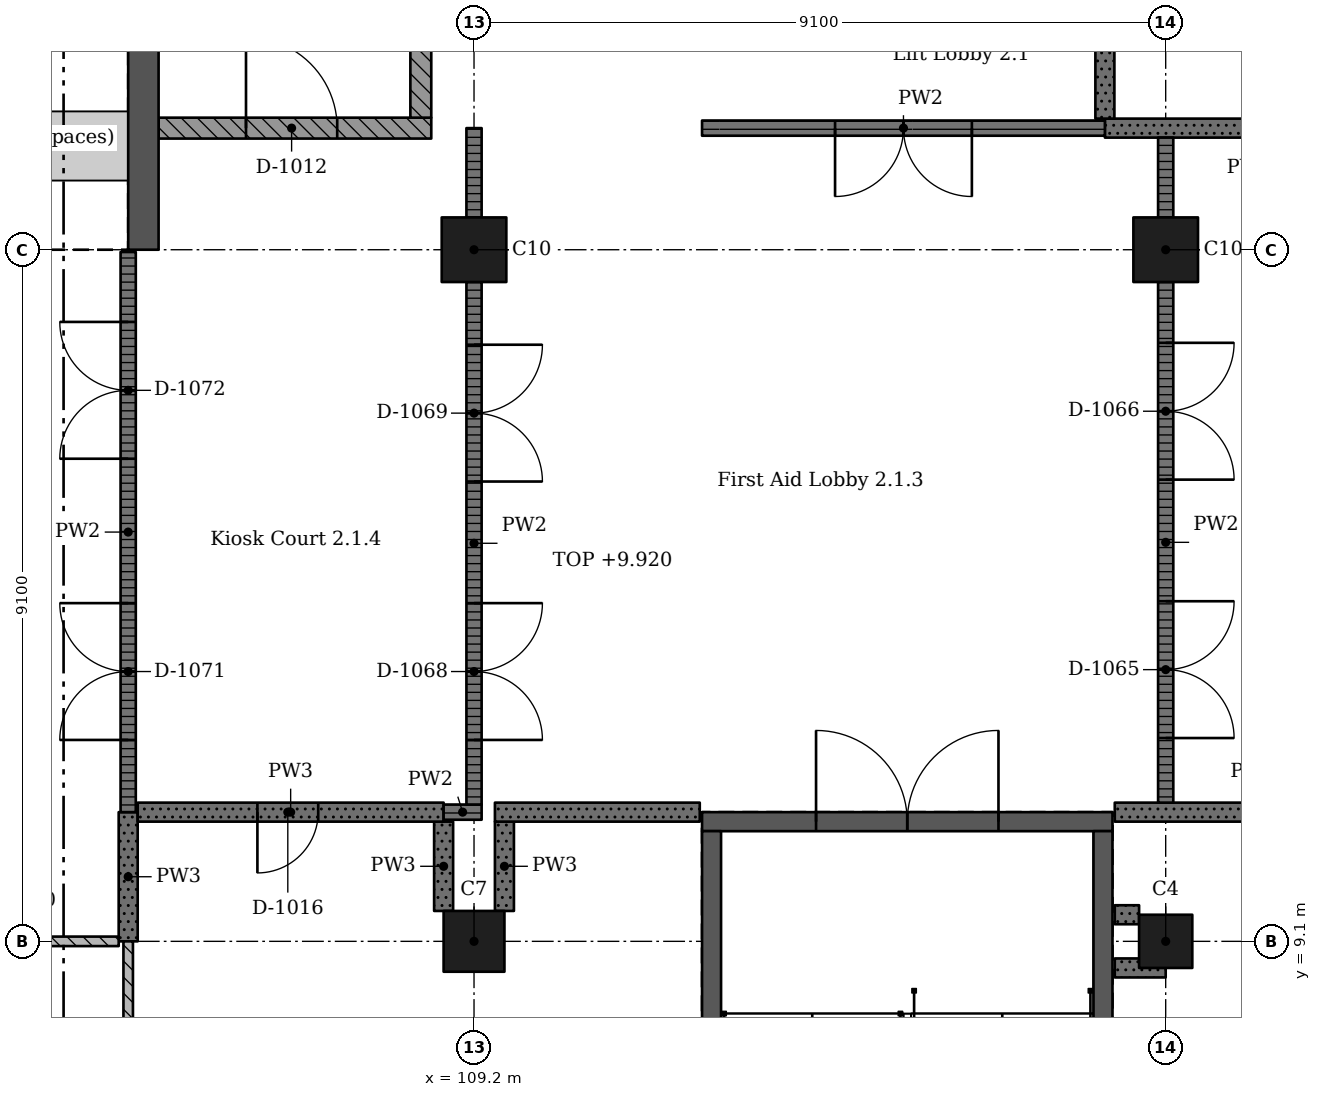
"""IFC4 building model, lengths in metres.
Left out: names, types, materials, properties, quantities, classifications, styles, units other than length and angle.
Written with IfcOpenShell. Run it as: python <this file> out.ifc"""

import sys

from ifc_helpers import new_model, si_unit, direction, frame, frame_2d, origin, origin_2d, place, context, subcontext, project, spatial, rectangle, extrude, element, fill, save


model = new_model("IFC4")
c1 = context("Model", 3, precision=1e-05, world=origin(), true_north=direction((0.0, 1.0)))
c2 = subcontext(c1, "Body", "Model", "MODEL_VIEW")
j1 = project(units=[si_unit("LENGTHUNIT", "METRE"), si_unit("PLANEANGLEUNIT", "RADIAN")], contexts=[c1])
p1 = place(None, origin())
s1 = spatial("IfcSite", under=j1, at=p1, CompositionType="ELEMENT")
p2 = place(p1, origin())
s2 = spatial("IfcBuilding", under=s1, at=p2, CompositionType="ELEMENT")
p3 = place(p2, frame((0.0, 0.0, 6.37)))
s3 = spatial("IfcBuildingStorey", under=s2, at=p3, CompositionType="ELEMENT", Elevation=6.37)
p4 = place(p3, frame((109.2, 9.1, 0.0), z_axis=(0.0, 0.0, 1.0), x_axis=(1.0, 0.0, 0.0)))
e1 = element("IfcColumn", 1, at=p4, inside=s3, PredefinedType="COLUMN", context=c2, shape_type="SweptSolid", body=[
    extrude(rectangle(XDim=0.8, YDim=0.8, at=origin_2d()), origin(), (0.0, 0.0, 1.0), 4.55),
])
p5 = place(p3, frame((109.2, 18.2, 0.0), z_axis=(0.0, 0.0, 1.0), x_axis=(1.0, 0.0, 0.0)))
e2 = element("IfcColumn", 2, at=p5, inside=s3, PredefinedType="COLUMN", context=c2, shape_type="SweptSolid", body=[
    extrude(rectangle(XDim=0.85, YDim=0.85, at=origin_2d()), origin(), (0.0, 0.0, 1.0), 4.55),
])
p6 = place(p3, frame((118.3, 9.1, 0.0), z_axis=(0.0, 0.0, 1.0), x_axis=(1.0, 0.0, 0.0)))
e3 = element("IfcColumn", 3, at=p6, inside=s3, PredefinedType="COLUMN", context=c2, shape_type="SweptSolid", body=[
    extrude(rectangle(XDim=0.7, YDim=0.7, at=origin_2d()), origin(), (0.0, 0.0, 1.0), 4.55),
])
p7 = place(p3, frame((118.3, 18.2, 0.0), z_axis=(0.0, 0.0, 1.0), x_axis=(1.0, 0.0, 0.0)))
e4 = element("IfcColumn", 4, at=p7, inside=s3, PredefinedType="COLUMN", context=c2, shape_type="SweptSolid", body=[
    extrude(rectangle(XDim=0.85, YDim=0.85, at=origin_2d()), origin(), (0.0, 0.0, 1.0), 4.55),
])
p8 = place(p3, frame((104.85, 40.95, 0.0), z_axis=(0.0, 0.0, 1.0), x_axis=(0.0, -1.0, 0.0)))
e5 = element("IfcWall", 5, at=p8, inside=s3, PredefinedType="SHEAR", context=c2, shape_type="SweptSolid", body=[
    extrude(rectangle(XDim=22.75, YDim=0.4, at=frame_2d((11.375, 0.0))), origin(), (0.0, 0.0, 1.0), 4.55),
])
p9 = place(p3, frame((117.6, 10.675, 0.0), z_axis=(0.0, 0.0, 1.0), x_axis=(-1.0, 0.0, 0.0)))
e6 = element("IfcWall", 6, at=p9, inside=s3, PredefinedType="SHEAR", context=c2, shape_type="SweptSolid", body=[
    extrude(rectangle(XDim=5.4, YDim=0.25, at=frame_2d((2.7, 0.0))), origin(), (0.0, 0.0, 1.0), 4.55),
])
p10 = place(p9, frame((1.5, 0.0, 0.0)))
e7 = element("IfcOpeningElement", 7, at=p10, cuts=e6, PredefinedType="OPENING", context=c2, shape_type="SweptSolid", body=[
    extrude(rectangle(XDim=2.4, YDim=2.1, at=frame_2d((1.2, 1.05))), frame((0.0, 0.135, 0.0), z_axis=(0.0, -1.0, 0.0), x_axis=(1.0, 0.0, 0.0)), (0.0, 0.0, 1.0), 0.27),
])
for number, where, z_axis, x_axis in (
    (8, (112.325, 10.55, 0.0), (0.0, 0.0, 1.0), (0.0, -1.0, 0.0)),
    (9, (117.475, 10.55, 0.0), (0.0, 0.0, 1.0), (0.0, -1.0, 0.0)),
):
    element("IfcWall", number, at=place(p3, frame(where, z_axis=z_axis, x_axis=x_axis)), inside=s3, PredefinedType="SHEAR", context=c2, shape_type="SweptSolid", body=[
        extrude(rectangle(XDim=9.6, YDim=0.25, at=frame_2d((4.8, 0.0))), origin(), (0.0, 0.0, 1.0), 4.55),
    ])
p11 = place(p3, frame((104.525, 9.1, 0.0), z_axis=(0.0, 0.0, 1.0), x_axis=(-1.0, 0.0, 0.0)))
e10 = element("IfcWall", 10, at=p11, inside=s3, PredefinedType="PARTITIONING", context=c2, shape_type="SweptSolid", body=[
    extrude(rectangle(XDim=3.925, YDim=0.125, at=frame_2d((1.962, 0.0))), origin(), (0.0, 0.0, 1.0), 3.55),
])
p12 = place(p11, frame((1.45, 0.0, 0.0)))
e11 = element("IfcOpeningElement", 11, at=p12, cuts=e10, PredefinedType="OPENING", context=c2, shape_type="SweptSolid", body=[
    extrude(rectangle(XDim=1.0, YDim=2.1, at=frame_2d((0.5, 1.05))), frame((0.0, 0.073, 0.0), z_axis=(0.0, -1.0, 0.0), x_axis=(1.0, 0.0, 0.0)), (0.0, 0.0, 1.0), 0.145),
])
p13 = place(p3, frame((104.65, 0.1, 0.0), z_axis=(0.0, 0.0, 1.0), x_axis=(0.0, 1.0, 0.0)))
e12 = element("IfcWall", 12, at=p13, inside=s3, PredefinedType="PARTITIONING", context=c2, shape_type="SweptSolid", body=[
    extrude(rectangle(XDim=9.0, YDim=0.125, at=frame_2d((4.5, 0.0))), origin(), (0.0, 0.0, 1.0), 4.25),
])
p14 = place(p3, frame((104.65, 9.1, 0.0), z_axis=(0.0, 0.0, 1.0), x_axis=(0.0, 1.0, 0.0)))
e13 = element("IfcWall", 13, at=p14, inside=s3, PredefinedType="SOLIDWALL", context=c2, shape_type="SweptSolid", body=[
    extrude(rectangle(XDim=1.7, YDim=0.25, at=frame_2d((0.85, 0.0))), origin(), (0.0, 0.0, 1.0), 4.25),
])
p15 = place(p3, frame((104.65, 10.8, 0.0), z_axis=(0.0, 0.0, 1.0), x_axis=(0.0, 1.0, 0.0)))
e14 = element("IfcWall", 14, at=p15, inside=s3, PredefinedType="PARTITIONING", context=c2, shape_type="SweptSolid", body=[
    extrude(rectangle(XDim=7.37, YDim=0.2, at=frame_2d((3.685, 0.0))), origin(), (0.0, 0.0, 1.0), 4.25),
])
p16 = place(p15, frame((0.95, 0.0, 0.0)))
e15 = element("IfcOpeningElement", 15, at=p16, cuts=e14, PredefinedType="OPENING", context=c2, shape_type="SweptSolid", body=[
    extrude(rectangle(XDim=1.8, YDim=2.4, at=frame_2d((0.9, 1.2))), frame((0.0, 0.11, 0.0), z_axis=(0.0, -1.0, 0.0), x_axis=(1.0, 0.0, 0.0)), (0.0, 0.0, 1.0), 0.22),
])
p17 = place(p15, frame((4.65, 0.0, 0.0)))
e16 = element("IfcOpeningElement", 16, at=p17, cuts=e14, PredefinedType="OPENING", context=c2, shape_type="SweptSolid", body=[
    extrude(rectangle(XDim=1.8, YDim=2.4, at=frame_2d((0.9, 1.2))), frame((0.0, 0.11, 0.0), z_axis=(0.0, -1.0, 0.0), x_axis=(1.0, 0.0, 0.0)), (0.0, 0.0, 1.0), 0.22),
])
p18 = place(p3, frame((105.05, 19.8, 0.0), z_axis=(0.0, 0.0, 1.0), x_axis=(1.0, 0.0, 0.0)))
e17 = element("IfcWall", 17, at=p18, inside=s3, PredefinedType="SOLIDWALL", context=c2, shape_type="SweptSolid", body=[
    extrude(rectangle(XDim=3.587, YDim=0.275, at=frame_2d((1.794, 0.0))), origin(), (0.0, 0.0, 1.0), 4.25),
])
p19 = place(p18, frame((1.15, 0.0, 0.0)))
e18 = element("IfcOpeningElement", 18, at=p19, cuts=e17, PredefinedType="OPENING", context=c2, shape_type="SweptSolid", body=[
    extrude(rectangle(XDim=1.2, YDim=2.4, at=frame_2d((0.6, 1.2))), frame((0.0, 0.147, 0.0), z_axis=(0.0, -1.0, 0.0), x_axis=(1.0, 0.0, 0.0)), (0.0, 0.0, 1.0), 0.295),
])
p20 = place(p3, frame((108.5, 19.938, 0.0), z_axis=(0.0, 0.0, 1.0), x_axis=(0.0, 1.0, 0.0)))
e19 = element("IfcWall", 19, at=p20, inside=s3, PredefinedType="SOLIDWALL", context=c2, shape_type="SweptSolid", body=[
    extrude(rectangle(XDim=6.962, YDim=0.275, at=frame_2d((3.481, 0.0))), origin(), (0.0, 0.0, 1.0), 4.25),
])
p21 = place(p3, frame((108.8, 9.5, 0.0), z_axis=(0.0, 0.0, 1.0), x_axis=(0.0, 1.0, 0.0)))
e20 = element("IfcWall", 20, at=p21, inside=s3, PredefinedType="SOLIDWALL", context=c2, shape_type="SweptSolid", body=[
    extrude(rectangle(XDim=1.175, YDim=0.25, at=frame_2d((0.587, 0.0))), origin(), (0.0, 0.0, 1.0), 4.25),
])
p22 = place(p3, frame((108.8, 10.8, 0.0), z_axis=(0.0, 0.0, 1.0), x_axis=(-1.0, 0.0, 0.0)))
e21 = element("IfcWall", 21, at=p22, inside=s3, PredefinedType="SOLIDWALL", context=c2, shape_type="SweptSolid", body=[
    extrude(rectangle(XDim=4.025, YDim=0.25, at=frame_2d((2.013, 0.0))), origin(), (0.0, 0.0, 1.0), 4.25),
])
p23 = place(p22, frame((1.65, 0.0, 0.0)))
e22 = element("IfcOpeningElement", 22, at=p23, cuts=e21, PredefinedType="OPENING", context=c2, shape_type="SweptSolid", body=[
    extrude(rectangle(XDim=0.8, YDim=2.1, at=frame_2d((0.4, 1.05))), frame((0.0, 0.135, 0.0), z_axis=(0.0, -1.0, 0.0), x_axis=(1.0, 0.0, 0.0)), (0.0, 0.0, 1.0), 0.27),
])
p24 = place(p3, frame((108.8, 10.8, 0.0), z_axis=(0.0, 0.0, 1.0), x_axis=(1.0, 0.0, 0.0)))
e23 = element("IfcWall", 23, at=p24, inside=s3, PredefinedType="PARTITIONING", context=c2, shape_type="SweptSolid", body=[
    extrude(rectangle(XDim=0.5, YDim=0.2, at=frame_2d((0.25, 0.0))), origin(), (0.0, 0.0, 1.0), 4.25),
])
p25 = place(p3, frame((109.2, 10.9, 0.0), z_axis=(0.0, 0.0, 1.0), x_axis=(0.0, 1.0, 0.0)))
e24 = element("IfcWall", 24, at=p25, inside=s3, PredefinedType="PARTITIONING", context=c2, shape_type="SweptSolid", body=[
    extrude(rectangle(XDim=6.875, YDim=0.2, at=frame_2d((3.438, 0.0))), origin(), (0.0, 0.0, 1.0), 3.55),
])
p26 = place(p25, frame((0.85, 0.0, 0.0)))
e25 = element("IfcOpeningElement", 25, at=p26, cuts=e24, PredefinedType="OPENING", context=c2, shape_type="SweptSolid", body=[
    extrude(rectangle(XDim=1.8, YDim=2.4, at=frame_2d((0.9, 1.2))), frame((0.0, 0.11, 0.0), z_axis=(0.0, -1.0, 0.0), x_axis=(1.0, 0.0, 0.0)), (0.0, 0.0, 1.0), 0.22),
])
p27 = place(p25, frame((4.25, 0.0, 0.0)))
e26 = element("IfcOpeningElement", 26, at=p27, cuts=e24, PredefinedType="OPENING", context=c2, shape_type="SweptSolid", body=[
    extrude(rectangle(XDim=1.8, YDim=2.4, at=frame_2d((0.9, 1.2))), frame((0.0, 0.11, 0.0), z_axis=(0.0, -1.0, 0.0), x_axis=(1.0, 0.0, 0.0)), (0.0, 0.0, 1.0), 0.22),
])
p28 = place(p3, frame((109.2, 18.625, 0.0), z_axis=(0.0, 0.0, 1.0), x_axis=(0.0, 1.0, 0.0)))
e27 = element("IfcWall", 27, at=p28, inside=s3, PredefinedType="PARTITIONING", context=c2, shape_type="SweptSolid", body=[
    extrude(rectangle(XDim=1.175, YDim=0.2, at=frame_2d((0.587, 0.0))), origin(), (0.0, 0.0, 1.0), 3.55),
])
p29 = place(p3, frame((109.6, 10.675, 0.0), z_axis=(0.0, 0.0, 1.0), x_axis=(0.0, -1.0, 0.0)))
e28 = element("IfcWall", 28, at=p29, inside=s3, PredefinedType="SOLIDWALL", context=c2, shape_type="SweptSolid", body=[
    extrude(rectangle(XDim=1.175, YDim=0.25, at=frame_2d((0.587, 0.0))), origin(), (0.0, 0.0, 1.0), 4.25),
])
p30 = place(p3, frame((112.17, 10.8, 0.0), z_axis=(0.0, 0.0, 1.0), x_axis=(-1.0, 0.0, 0.0)))
e29 = element("IfcWall", 29, at=p30, inside=s3, PredefinedType="SOLIDWALL", context=c2, shape_type="SweptSolid", body=[
    extrude(rectangle(XDim=2.695, YDim=0.25, at=frame_2d((1.347, 0.0))), origin(), (0.0, 0.0, 1.0), 4.25),
])
p31 = place(p3, frame((112.2, 19.8, 0.0), z_axis=(0.0, 0.0, 1.0), x_axis=(1.0, 0.0, 0.0)))
e30 = element("IfcWall", 30, at=p31, inside=s3, PredefinedType="PARTITIONING", context=c2, shape_type="SweptSolid", body=[
    extrude(rectangle(XDim=5.3, YDim=0.2, at=frame_2d((2.65, 0.0))), origin(), (0.0, 0.0, 1.0), 4.25),
])
p32 = place(p31, frame((1.75, 0.0, 0.0)))
e31 = element("IfcOpeningElement", 31, at=p32, cuts=e30, PredefinedType="OPENING", context=c2, shape_type="SweptSolid", body=[
    extrude(rectangle(XDim=1.8, YDim=2.4, at=frame_2d((0.9, 1.2))), frame((0.0, 0.11, 0.0), z_axis=(0.0, -1.0, 0.0), x_axis=(1.0, 0.0, 0.0)), (0.0, 0.0, 1.0), 0.22),
])
p33 = place(p3, frame((117.5, 19.8, 0.0), z_axis=(0.0, 0.0, 1.0), x_axis=(1.0, 0.0, 0.0)))
e32 = element("IfcWall", 32, at=p33, inside=s3, PredefinedType="SOLIDWALL", context=c2, shape_type="SweptSolid", body=[
    extrude(rectangle(XDim=3.8, YDim=0.25, at=frame_2d((1.9, 0.0))), origin(), (0.0, 0.0, 1.0), 4.25),
])
p34 = place(p33, frame((1.85, 0.0, 0.0)))
e33 = element("IfcOpeningElement", 33, at=p34, cuts=e32, PredefinedType="OPENING", context=c2, shape_type="SweptSolid", body=[
    extrude(rectangle(XDim=1.0, YDim=2.1, at=frame_2d((0.5, 1.05))), frame((0.0, 0.135, 0.0), z_axis=(0.0, -1.0, 0.0), x_axis=(1.0, 0.0, 0.0)), (0.0, 0.0, 1.0), 0.27),
])
p35 = place(p3, frame((117.5, 19.925, 0.0), z_axis=(0.0, 0.0, 1.0), x_axis=(0.0, 1.0, 0.0)))
e34 = element("IfcWall", 34, at=p35, inside=s3, PredefinedType="SOLIDWALL", context=c2, shape_type="SweptSolid", body=[
    extrude(rectangle(XDim=2.845, YDim=0.25, at=frame_2d((1.422, 0.0))), origin(), (0.0, 0.0, 1.0), 4.25),
])
p36 = place(p3, frame((117.63, 8.75, 0.0), z_axis=(0.0, 0.0, 1.0), x_axis=(1.0, 0.0, 0.0)))
e35 = element("IfcWall", 35, at=p36, inside=s3, PredefinedType="SOLIDWALL", context=c2, shape_type="SweptSolid", body=[
    extrude(rectangle(XDim=0.67, YDim=0.25, at=frame_2d((0.335, 0.0))), origin(), (0.0, 0.0, 1.0), 4.25),
])
p37 = place(p3, frame((117.95, 9.45, 0.0), z_axis=(0.0, 0.0, 1.0), x_axis=(-1.0, 0.0, 0.0)))
e36 = element("IfcWall", 36, at=p37, inside=s3, PredefinedType="SOLIDWALL", context=c2, shape_type="SweptSolid", body=[
    extrude(rectangle(XDim=0.32, YDim=0.25, at=frame_2d((0.16, 0.0))), origin(), (0.0, 0.0, 1.0), 4.25),
])
p38 = place(p3, frame((117.63, 10.8, 0.0), z_axis=(0.0, 0.0, 1.0), x_axis=(1.0, 0.0, 0.0)))
e37 = element("IfcWall", 37, at=p38, inside=s3, PredefinedType="SOLIDWALL", context=c2, shape_type="SweptSolid", body=[
    extrude(rectangle(XDim=3.64, YDim=0.25, at=frame_2d((1.82, 0.0))), origin(), (0.0, 0.0, 1.0), 4.25),
])
p39 = place(p38, frame((1.69, 0.0, 0.0)))
e38 = element("IfcOpeningElement", 38, at=p39, cuts=e37, PredefinedType="OPENING", context=c2, shape_type="SweptSolid", body=[
    extrude(rectangle(XDim=1.0, YDim=2.1, at=frame_2d((0.5, 1.05))), frame((0.0, 0.135, 0.0), z_axis=(0.0, -1.0, 0.0), x_axis=(1.0, 0.0, 0.0)), (0.0, 0.0, 1.0), 0.27),
])
p40 = place(p3, frame((118.3, 10.925, 0.0), z_axis=(0.0, 0.0, 1.0), x_axis=(0.0, 1.0, 0.0)))
e39 = element("IfcWall", 39, at=p40, inside=s3, PredefinedType="PARTITIONING", context=c2, shape_type="SweptSolid", body=[
    extrude(rectangle(XDim=6.85, YDim=0.2, at=frame_2d((3.425, 0.0))), origin(), (0.0, 0.0, 1.0), 3.55),
])
p41 = place(p40, frame((0.85, 0.0, 0.0)))
e40 = element("IfcOpeningElement", 40, at=p41, cuts=e39, PredefinedType="OPENING", context=c2, shape_type="SweptSolid", body=[
    extrude(rectangle(XDim=1.8, YDim=2.4, at=frame_2d((0.9, 1.2))), frame((0.0, 0.11, 0.0), z_axis=(0.0, -1.0, 0.0), x_axis=(1.0, 0.0, 0.0)), (0.0, 0.0, 1.0), 0.22),
])
p42 = place(p40, frame((4.25, 0.0, 0.0)))
e41 = element("IfcOpeningElement", 41, at=p42, cuts=e39, PredefinedType="OPENING", context=c2, shape_type="SweptSolid", body=[
    extrude(rectangle(XDim=1.8, YDim=2.4, at=frame_2d((0.9, 1.2))), frame((0.0, 0.11, 0.0), z_axis=(0.0, -1.0, 0.0), x_axis=(1.0, 0.0, 0.0)), (0.0, 0.0, 1.0), 0.22),
])
p43 = place(p3, frame((118.3, 18.625, 0.0), z_axis=(0.0, 0.0, 1.0), x_axis=(0.0, 1.0, 0.0)))
e42 = element("IfcWall", 42, at=p43, inside=s3, PredefinedType="PARTITIONING", context=c2, shape_type="SweptSolid", body=[
    extrude(rectangle(XDim=1.05, YDim=0.2, at=frame_2d((0.525, 0.0))), origin(), (0.0, 0.0, 1.0), 3.55),
])
p44 = place(p19, origin())
e43 = element("IfcDoor", 43, at=p44, inside=s3, OperationType="SINGLE_SWING_RIGHT", PredefinedType="DOOR", context=c2, shape_type="SweptSolid", body=[
    extrude(rectangle(XDim=1.2, YDim=2.4, at=frame_2d((0.6, 1.2))), frame((0.0, 0.025, 0.0), z_axis=(0.0, -1.0, 0.0), x_axis=(1.0, 0.0, 0.0)), (0.0, 0.0, 1.0), 0.05),
])
fill(e18, e43)
p45 = place(p23, origin())
e44 = element("IfcDoor", 44, at=p45, inside=s3, OperationType="SINGLE_SWING_LEFT", PredefinedType="DOOR", context=c2, shape_type="SweptSolid", body=[
    extrude(rectangle(XDim=0.8, YDim=2.1, at=frame_2d((0.4, 1.05))), frame((0.0, 0.025, 0.0), z_axis=(0.0, -1.0, 0.0), x_axis=(1.0, 0.0, 0.0)), (0.0, 0.0, 1.0), 0.05),
])
fill(e22, e44)
p46 = place(p41, origin())
e45 = element("IfcDoor", 45, at=p46, inside=s3, OperationType="DOUBLE_DOOR_SINGLE_SWING", PredefinedType="DOOR", context=c2, shape_type="SweptSolid", body=[
    extrude(rectangle(XDim=1.8, YDim=2.4, at=frame_2d((0.9, 1.2))), frame((0.0, 0.025, 0.0), z_axis=(0.0, -1.0, 0.0), x_axis=(1.0, 0.0, 0.0)), (0.0, 0.0, 1.0), 0.05),
])
fill(e40, e45)
p47 = place(p42, origin())
e46 = element("IfcDoor", 46, at=p47, inside=s3, OperationType="DOUBLE_DOOR_SINGLE_SWING", PredefinedType="DOOR", context=c2, shape_type="SweptSolid", body=[
    extrude(rectangle(XDim=1.8, YDim=2.4, at=frame_2d((0.9, 1.2))), frame((0.0, 0.025, 0.0), z_axis=(0.0, -1.0, 0.0), x_axis=(1.0, 0.0, 0.0)), (0.0, 0.0, 1.0), 0.05),
])
fill(e41, e46)
p48 = place(p26, origin())
e47 = element("IfcDoor", 47, at=p48, inside=s3, OperationType="DOUBLE_DOOR_SINGLE_SWING", PredefinedType="DOOR", context=c2, shape_type="SweptSolid", body=[
    extrude(rectangle(XDim=1.8, YDim=2.4, at=frame_2d((0.9, 1.2))), frame((0.0, 0.025, 0.0), z_axis=(0.0, -1.0, 0.0), x_axis=(1.0, 0.0, 0.0)), (0.0, 0.0, 1.0), 0.05),
])
fill(e25, e47)
p49 = place(p27, origin())
e48 = element("IfcDoor", 48, at=p49, inside=s3, OperationType="DOUBLE_DOOR_SINGLE_SWING", PredefinedType="DOOR", context=c2, shape_type="SweptSolid", body=[
    extrude(rectangle(XDim=1.8, YDim=2.4, at=frame_2d((0.9, 1.2))), frame((0.0, 0.025, 0.0), z_axis=(0.0, -1.0, 0.0), x_axis=(1.0, 0.0, 0.0)), (0.0, 0.0, 1.0), 0.05),
])
fill(e26, e48)
p50 = place(p32, origin())
e49 = element("IfcDoor", 49, at=p50, inside=s3, OperationType="DOUBLE_DOOR_SINGLE_SWING", PredefinedType="DOOR", context=c2, shape_type="SweptSolid", body=[
    extrude(rectangle(XDim=1.8, YDim=2.4, at=frame_2d((0.9, 1.2))), frame((0.0, 0.025, 0.0), z_axis=(0.0, -1.0, 0.0), x_axis=(1.0, 0.0, 0.0)), (0.0, 0.0, 1.0), 0.05),
])
fill(e31, e49)
p51 = place(p16, origin())
e50 = element("IfcDoor", 50, at=p51, inside=s3, OperationType="DOUBLE_DOOR_SINGLE_SWING", PredefinedType="DOOR", context=c2, shape_type="SweptSolid", body=[
    extrude(rectangle(XDim=1.8, YDim=2.4, at=frame_2d((0.9, 1.2))), frame((0.0, 0.025, 0.0), z_axis=(0.0, -1.0, 0.0), x_axis=(1.0, 0.0, 0.0)), (0.0, 0.0, 1.0), 0.05),
])
fill(e15, e50)
p52 = place(p17, origin())
e51 = element("IfcDoor", 51, at=p52, inside=s3, OperationType="DOUBLE_DOOR_SINGLE_SWING", PredefinedType="DOOR", context=c2, shape_type="SweptSolid", body=[
    extrude(rectangle(XDim=1.8, YDim=2.4, at=frame_2d((0.9, 1.2))), frame((0.0, 0.025, 0.0), z_axis=(0.0, -1.0, 0.0), x_axis=(1.0, 0.0, 0.0)), (0.0, 0.0, 1.0), 0.05),
])
fill(e16, e51)
p53 = place(p10, origin())
e52 = element("IfcDoor", 52, at=p53, inside=s3, OperationType="DOUBLE_DOOR_SINGLE_SWING", PredefinedType="DOOR", context=c2, shape_type="SweptSolid", body=[
    extrude(rectangle(XDim=2.4, YDim=2.1, at=frame_2d((1.2, 1.05))), frame((0.0, 0.025, 0.0), z_axis=(0.0, -1.0, 0.0), x_axis=(1.0, 0.0, 0.0)), (0.0, 0.0, 1.0), 0.05),
])
fill(e7, e52)
save(model, sys.argv[1])
